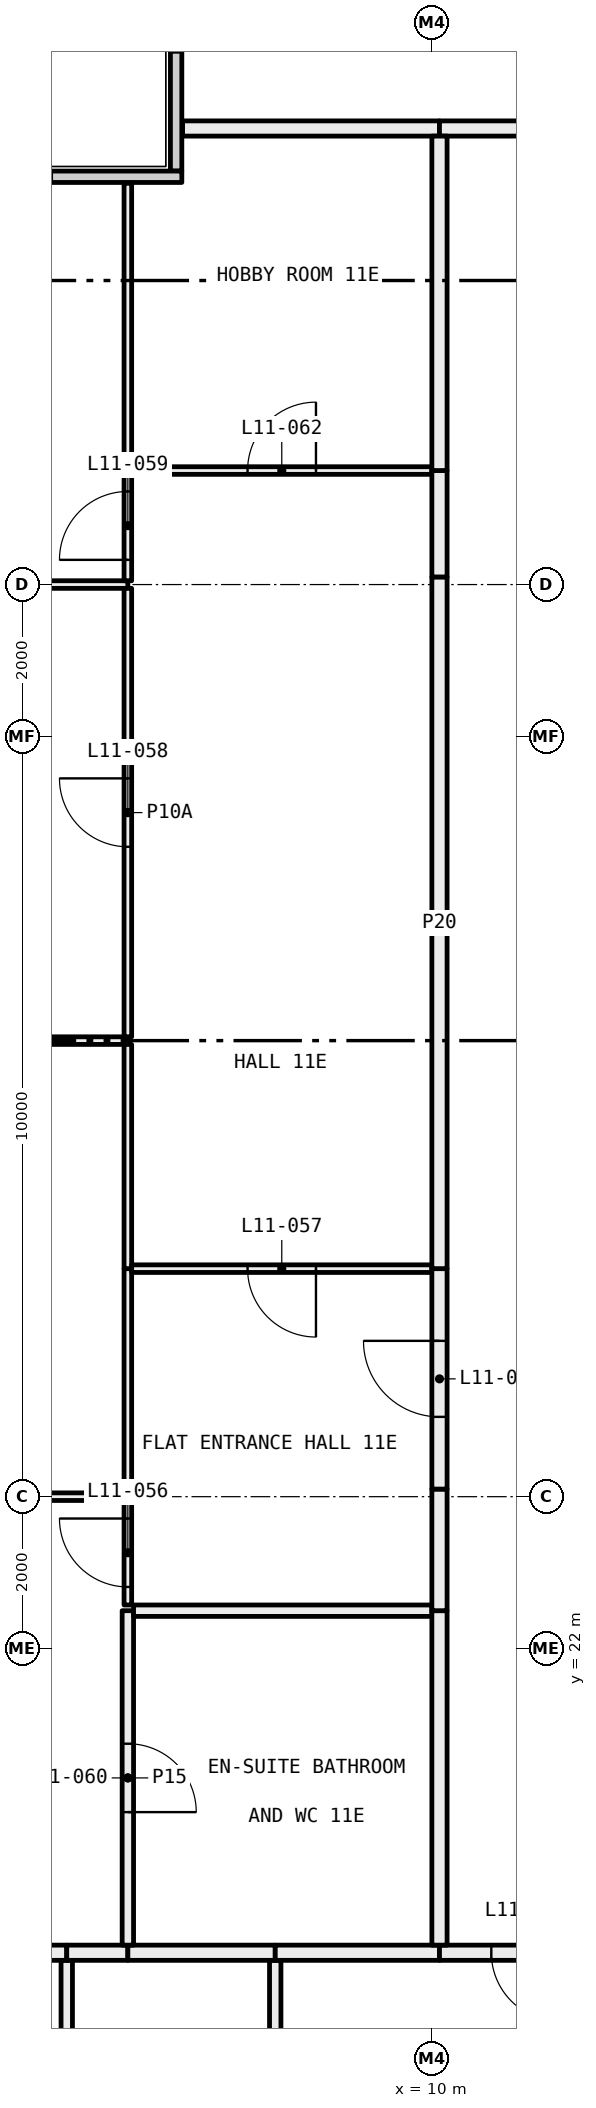
"""IFC4 building model, lengths in metres.
Left out: names, types, materials, properties, quantities, classifications, styles, units other than length and angle.
Written with IfcOpenShell. Run it as: python <this file> out.ifc"""

import sys

from ifc_helpers import new_model, si_unit, direction, frame, frame_2d, origin, place, context, subcontext, project, spatial, rectangle, extrude, element, fill, save


model = new_model("IFC4")
c1 = context("Model", 3, precision=1e-05, world=origin(), true_north=direction((0.0, 1.0)))
c2 = subcontext(c1, "Body", "Model", "MODEL_VIEW")
j1 = project(units=[si_unit("LENGTHUNIT", "METRE"), si_unit("PLANEANGLEUNIT", "RADIAN")], contexts=[c1])
p1 = place(None, origin())
s1 = spatial("IfcSite", under=j1, at=p1, CompositionType="ELEMENT")
p2 = place(p1, origin())
s2 = spatial("IfcBuilding", under=s1, at=p2, CompositionType="ELEMENT")
p3 = place(p2, frame((0.0, 0.0, 50.7)))
s3 = spatial("IfcBuildingStorey", under=s2, at=p3, CompositionType="ELEMENT", Elevation=50.7)
p4 = place(p3, frame((6.635, 41.44, 0.0), z_axis=(0.0, 0.0, 1.0), x_axis=(0.0, 1.0, 0.0)))
e1 = element("IfcWall", 1, at=p4, inside=s3, PredefinedType="ELEMENTEDWALL", context=c2, shape_type="SweptSolid", body=[
    extrude(rectangle(XDim=5.85, YDim=0.15, at=frame_2d((2.925, 0.0))), origin(), (0.0, 0.0, 1.0), 3.05),
])
p5 = place(p4, frame((1.56, 0.0, 0.45)))
e2 = element("IfcOpeningElement", 2, at=p5, cuts=e1, PredefinedType="OPENING", context=c2, shape_type="SweptSolid", body=[
    extrude(rectangle(XDim=4.0, YDim=2.55, at=frame_2d((2.0, 1.275))), frame((0.0, 0.085, 0.0), z_axis=(0.0, -1.0, 0.0), x_axis=(1.0, 0.0, 0.0)), (0.0, 0.0, 1.0), 0.17),
])
p6 = place(p3, frame((0.56, 41.365, 0.0), z_axis=(0.0, 0.0, 1.0), x_axis=(1.0, 0.0, 0.0)))
e3 = element("IfcWall", 3, at=p6, inside=s3, PredefinedType="ELEMENTEDWALL", context=c2, shape_type="SweptSolid", body=[
    extrude(rectangle(XDim=6.15, YDim=0.15, at=frame_2d((3.075, 0.0))), origin(), (0.0, 0.0, 1.0), 3.05),
])
p7 = place(p6, frame((0.44, 0.0, 0.45)))
e4 = element("IfcOpeningElement", 4, at=p7, cuts=e3, PredefinedType="OPENING", context=c2, shape_type="SweptSolid", body=[
    extrude(rectangle(XDim=4.0, YDim=2.55, at=frame_2d((2.0, 1.275))), frame((0.0, 0.085, 0.0), z_axis=(0.0, -1.0, 0.0), x_axis=(1.0, 0.0, 0.0)), (0.0, 0.0, 1.0), 0.17),
])
p8 = place(p3, frame((5.196, 12.075, 0.0), z_axis=(0.0, 0.0, 1.0), x_axis=(0.0, 1.0, 0.0)))
e5 = element("IfcWall", 5, at=p8, inside=s3, PredefinedType="PARTITIONING", context=c2, shape_type="SweptSolid", body=[
    extrude(rectangle(XDim=5.825, YDim=0.15, at=frame_2d((2.913, 0.0))), origin(), (0.0, 0.0, 1.0), 2.45),
])
p9 = place(p3, frame((5.196, 18.0, 0.0), z_axis=(0.0, 0.0, 1.0), x_axis=(-1.0, 0.0, 0.0)))
e6 = element("IfcWall", 6, at=p9, inside=s3, PredefinedType="PARTITIONING", context=c2, shape_type="SweptSolid", body=[
    extrude(rectangle(XDim=4.476, YDim=0.2, at=frame_2d((2.238, 0.0))), origin(), (0.0, 0.0, 1.0), 3.05),
])
p10 = place(p3, frame((7.939, 14.712, 0.0), z_axis=(0.0, 0.0, 1.0), x_axis=(0.0, 1.0, 0.0)))
e7 = element("IfcWall", 7, at=p10, inside=s3, PredefinedType="PARTITIONING", context=c2, shape_type="SweptSolid", body=[
    extrude(rectangle(XDim=3.188, YDim=0.15, at=frame_2d((1.594, 0.0))), origin(), (0.0, 0.0, 1.0), 3.05),
])
p11 = place(p3, frame((6.0, 18.0, 0.0), z_axis=(0.0, 0.0, 1.0), x_axis=(-1.0, 0.0, 0.0)))
e8 = element("IfcWall", 8, at=p11, inside=s3, PredefinedType="PARTITIONING", context=c2, shape_type="SweptSolid", body=[
    extrude(rectangle(XDim=0.804, YDim=0.2, at=frame_2d((0.402, 0.0))), origin(), (0.0, 0.0, 1.0), 3.05),
])
p12 = place(p3, frame((7.939, 18.0, 0.0), z_axis=(0.0, 0.0, 1.0), x_axis=(-1.0, 0.0, 0.0)))
e9 = element("IfcWall", 9, at=p12, inside=s3, PredefinedType="PARTITIONING", context=c2, shape_type="SweptSolid", body=[
    extrude(rectangle(XDim=1.939, YDim=0.2, at=frame_2d((0.969, 0.0))), origin(), (0.0, 0.0, 1.0), 3.05),
])
p13 = place(p3, frame((10.1, 18.0, 0.0), z_axis=(0.0, 0.0, 1.0), x_axis=(-1.0, 0.0, 0.0)))
e10 = element("IfcWall", 10, at=p13, inside=s3, PredefinedType="PARTITIONING", context=c2, shape_type="SweptSolid", body=[
    extrude(rectangle(XDim=2.161, YDim=0.2, at=frame_2d((1.081, 0.0))), origin(), (0.0, 0.0, 1.0), 3.05),
])
p14 = place(p3, frame((12.364, 18.0, 0.0), z_axis=(0.0, 0.0, 1.0), x_axis=(-1.0, 0.0, 0.0)))
e11 = element("IfcWall", 11, at=p14, inside=s3, PredefinedType="PARTITIONING", context=c2, shape_type="SweptSolid", body=[
    extrude(rectangle(XDim=2.264, YDim=0.2, at=frame_2d((1.132, 0.0))), origin(), (0.0, 0.0, 1.0), 3.05),
])
p15 = place(p14, frame((0.682, 0.0, 0.0)))
e12 = element("IfcOpeningElement", 12, at=p15, cuts=e11, PredefinedType="OPENING", context=c2, shape_type="SweptSolid", body=[
    extrude(rectangle(XDim=0.9, YDim=2.1, at=frame_2d((0.45, 1.05))), frame((0.0, 0.11, 0.0), z_axis=(0.0, -1.0, 0.0), x_axis=(1.0, 0.0, 0.0)), (0.0, 0.0, 1.0), 0.22),
])
p16 = place(p3, frame((6.72, 42.0, 0.0), z_axis=(0.0, 0.0, 1.0), x_axis=(1.0, 0.0, 0.0)))
e13 = element("IfcWall", 13, at=p16, inside=s3, PredefinedType="PARTITIONING", context=c2, shape_type="SweptSolid", body=[
    extrude(rectangle(XDim=3.38, YDim=0.2, at=frame_2d((1.69, 0.0))), origin(), (0.0, 0.0, 1.0), 3.05),
])
p17 = place(p3, frame((10.1, 42.0, 0.0), z_axis=(0.0, 0.0, 1.0), x_axis=(1.0, 0.0, 0.0)))
e14 = element("IfcWall", 14, at=p17, inside=s3, PredefinedType="PARTITIONING", context=c2, shape_type="SweptSolid", body=[
    extrude(rectangle(XDim=1.9, YDim=0.2, at=frame_2d((0.95, 0.0))), origin(), (0.0, 0.0, 1.0), 3.05),
])
p18 = place(p3, frame((6.0, 24.0, 0.0), z_axis=(0.0, 0.0, 1.0), x_axis=(-1.0, 0.0, 0.0)))
e15 = element("IfcWall", 15, at=p18, inside=s3, PredefinedType="PARTITIONING", context=c2, shape_type="SweptSolid", body=[
    extrude(rectangle(XDim=5.28, YDim=0.1, at=frame_2d((2.64, 0.0))), origin(), (0.0, 0.0, 1.0), 2.45),
])
p19 = place(p18, frame((2.19, 0.0, 0.0)))
e16 = element("IfcOpeningElement", 16, at=p19, cuts=e15, PredefinedType="OPENING", context=c2, shape_type="SweptSolid", body=[
    extrude(rectangle(XDim=0.9, YDim=2.1, at=frame_2d((0.45, 1.05))), frame((0.0, 0.06, 0.0), z_axis=(0.0, -1.0, 0.0), x_axis=(1.0, 0.0, 0.0)), (0.0, 0.0, 1.0), 0.12),
])
p20 = place(p3, frame((6.0, 18.1, 0.0), z_axis=(0.0, 0.0, 1.0), x_axis=(0.0, 1.0, 0.0)))
e17 = element("IfcWall", 17, at=p20, inside=s3, PredefinedType="PARTITIONING", context=c2, shape_type="SweptSolid", body=[
    extrude(rectangle(XDim=4.4, YDim=0.15, at=frame_2d((2.2, 0.0))), origin(), (0.0, 0.0, 1.0), 3.05),
])
p21 = place(p20, frame((1.75, 0.0, 0.0)))
e18 = element("IfcOpeningElement", 18, at=p21, cuts=e17, PredefinedType="OPENING", context=c2, shape_type="SweptSolid", body=[
    extrude(rectangle(XDim=0.9, YDim=2.1, at=frame_2d((0.45, 1.05))), frame((0.0, 0.085, 0.0), z_axis=(0.0, -1.0, 0.0), x_axis=(1.0, 0.0, 0.0)), (0.0, 0.0, 1.0), 0.17),
])
p22 = place(p3, frame((6.0, 22.575, 0.0), z_axis=(0.0, 0.0, 1.0), x_axis=(0.0, 1.0, 0.0)))
e19 = element("IfcWall", 19, at=p22, inside=s3, PredefinedType="PARTITIONING", context=c2, shape_type="SweptSolid", body=[
    extrude(rectangle(XDim=1.375, YDim=0.1, at=frame_2d((0.688, 0.0))), origin(), (0.0, 0.0, 1.0), 2.45),
])
p23 = place(p22, frame((0.238, 0.0, 0.0)))
e20 = element("IfcOpeningElement", 20, at=p23, cuts=e19, PredefinedType="OPENING", context=c2, shape_type="SweptSolid", body=[
    extrude(rectangle(XDim=0.9, YDim=2.1, at=frame_2d((0.45, 1.05))), frame((0.0, 0.06, 0.0), z_axis=(0.0, -1.0, 0.0), x_axis=(1.0, 0.0, 0.0)), (0.0, 0.0, 1.0), 0.12),
])
p24 = place(p3, frame((6.0, 30.0, 0.0), z_axis=(0.0, 0.0, 1.0), x_axis=(-1.0, 0.0, 0.0)))
e21 = element("IfcWall", 21, at=p24, inside=s3, PredefinedType="PARTITIONING", context=c2, shape_type="SweptSolid", body=[
    extrude(rectangle(XDim=5.28, YDim=0.1, at=frame_2d((2.64, 0.0))), origin(), (0.0, 0.0, 1.0), 3.05),
])
p25 = place(p3, frame((6.0, 24.05, 0.0), z_axis=(0.0, 0.0, 1.0), x_axis=(0.0, 1.0, 0.0)))
e22 = element("IfcWall", 22, at=p25, inside=s3, PredefinedType="PARTITIONING", context=c2, shape_type="SweptSolid", body=[
    extrude(rectangle(XDim=2.95, YDim=0.1, at=frame_2d((1.475, 0.0))), origin(), (0.0, 0.0, 1.0), 2.45),
])
p26 = place(p3, frame((6.0, 27.0, 0.0), z_axis=(0.0, 0.0, 1.0), x_axis=(0.0, 1.0, 0.0)))
e23 = element("IfcWall", 23, at=p26, inside=s3, PredefinedType="PARTITIONING", context=c2, shape_type="SweptSolid", body=[
    extrude(rectangle(XDim=2.95, YDim=0.1, at=frame_2d((1.475, 0.0))), origin(), (0.0, 0.0, 1.0), 3.05),
])
p27 = place(p3, frame((6.0, 36.0, 0.0), z_axis=(0.0, 0.0, 1.0), x_axis=(-1.0, 0.0, 0.0)))
e24 = element("IfcWall", 24, at=p27, inside=s3, PredefinedType="PARTITIONING", context=c2, shape_type="SweptSolid", body=[
    extrude(rectangle(XDim=5.28, YDim=0.1, at=frame_2d((2.64, 0.0))), origin(), (0.0, 0.0, 1.0), 2.45),
])
p28 = place(p3, frame((6.0, 30.05, 0.0), z_axis=(0.0, 0.0, 1.0), x_axis=(0.0, 1.0, 0.0)))
e25 = element("IfcWall", 25, at=p28, inside=s3, PredefinedType="PARTITIONING", context=c2, shape_type="SweptSolid", body=[
    extrude(rectangle(XDim=5.9, YDim=0.1, at=frame_2d((2.95, 0.0))), origin(), (0.0, 0.0, 1.0), 2.45),
])
p29 = place(p28, frame((2.5, 0.0, 0.0)))
e26 = element("IfcOpeningElement", 26, at=p29, cuts=e25, PredefinedType="OPENING", context=c2, shape_type="SweptSolid", body=[
    extrude(rectangle(XDim=0.9, YDim=2.1, at=frame_2d((0.45, 1.05))), frame((0.0, 0.06, 0.0), z_axis=(0.0, -1.0, 0.0), x_axis=(1.0, 0.0, 0.0)), (0.0, 0.0, 1.0), 0.12),
])
p30 = place(p3, frame((6.0, 36.05, 0.0), z_axis=(0.0, 0.0, 1.0), x_axis=(0.0, 1.0, 0.0)))
e27 = element("IfcWall", 27, at=p30, inside=s3, PredefinedType="PARTITIONING", context=c2, shape_type="SweptSolid", body=[
    extrude(rectangle(XDim=1.45, YDim=0.1, at=frame_2d((0.725, 0.0))), origin(), (0.0, 0.0, 1.0), 2.45),
])
p31 = place(p30, frame((0.275, 0.0, 0.0)))
e28 = element("IfcOpeningElement", 28, at=p31, cuts=e27, PredefinedType="OPENING", context=c2, shape_type="SweptSolid", body=[
    extrude(rectangle(XDim=0.9, YDim=2.1, at=frame_2d((0.45, 1.05))), frame((0.0, 0.06, 0.0), z_axis=(0.0, -1.0, 0.0), x_axis=(1.0, 0.0, 0.0)), (0.0, 0.0, 1.0), 0.12),
])
p32 = place(p3, frame((6.0, 37.5, 0.0), z_axis=(0.0, 0.0, 1.0), x_axis=(0.0, 1.0, 0.0)))
e29 = element("IfcWall", 29, at=p32, inside=s3, PredefinedType="PARTITIONING", context=c2, shape_type="SweptSolid", body=[
    extrude(rectangle(XDim=3.78, YDim=0.1, at=frame_2d((1.89, 0.0))), origin(), (0.0, 0.0, 1.0), 3.05),
])
p33 = place(p3, frame((10.0, 22.5, 0.0), z_axis=(0.0, 0.0, 1.0), x_axis=(-1.0, 0.0, 0.0)))
e30 = element("IfcWall", 30, at=p33, inside=s3, PredefinedType="PARTITIONING", context=c2, shape_type="SweptSolid", body=[
    extrude(rectangle(XDim=3.925, YDim=0.15, at=frame_2d((1.962, 0.0))), origin(), (0.0, 0.0, 1.0), 3.05),
])
p34 = place(p3, frame((10.1, 18.1, 0.0), z_axis=(0.0, 0.0, 1.0), x_axis=(0.0, 1.0, 0.0)))
e31 = element("IfcWall", 31, at=p34, inside=s3, PredefinedType="PARTITIONING", context=c2, shape_type="SweptSolid", body=[
    extrude(rectangle(XDim=4.4, YDim=0.2, at=frame_2d((2.2, 0.0))), origin(), (0.0, 0.0, 1.0), 3.05),
])
p35 = place(p3, frame((10.0, 27.0, 0.0), z_axis=(0.0, 0.0, 1.0), x_axis=(-1.0, 0.0, 0.0)))
e32 = element("IfcWall", 32, at=p35, inside=s3, PredefinedType="PARTITIONING", context=c2, shape_type="SweptSolid", body=[
    extrude(rectangle(XDim=3.95, YDim=0.1, at=frame_2d((1.975, 0.0))), origin(), (0.0, 0.0, 1.0), 3.05),
])
p36 = place(p35, frame((1.525, 0.0, 0.0)))
e33 = element("IfcOpeningElement", 33, at=p36, cuts=e32, PredefinedType="OPENING", context=c2, shape_type="SweptSolid", body=[
    extrude(rectangle(XDim=0.9, YDim=2.1, at=frame_2d((0.45, 1.05))), frame((0.0, 0.06, 0.0), z_axis=(0.0, -1.0, 0.0), x_axis=(1.0, 0.0, 0.0)), (0.0, 0.0, 1.0), 0.12),
])
p37 = place(p3, frame((10.1, 22.5, 0.0), z_axis=(0.0, 0.0, 1.0), x_axis=(0.0, 1.0, 0.0)))
e34 = element("IfcWall", 34, at=p37, inside=s3, PredefinedType="PARTITIONING", context=c2, shape_type="SweptSolid", body=[
    extrude(rectangle(XDim=1.6, YDim=0.2, at=frame_2d((0.8, 0.0))), origin(), (0.0, 0.0, 1.0), 2.45),
])
p38 = place(p3, frame((10.1, 24.1, 0.0), z_axis=(0.0, 0.0, 1.0), x_axis=(0.0, 1.0, 0.0)))
e35 = element("IfcWall", 35, at=p38, inside=s3, PredefinedType="PARTITIONING", context=c2, shape_type="SweptSolid", body=[
    extrude(rectangle(XDim=2.9, YDim=0.2, at=frame_2d((1.45, 0.0))), origin(), (0.0, 0.0, 1.0), 3.05),
])
p39 = place(p38, frame((0.95, 0.0, 0.0)))
e36 = element("IfcOpeningElement", 36, at=p39, cuts=e35, PredefinedType="OPENING", context=c2, shape_type="SweptSolid", body=[
    extrude(rectangle(XDim=1.0, YDim=2.1, at=frame_2d((0.5, 1.05))), frame((0.0, 0.11, 0.0), z_axis=(0.0, -1.0, 0.0), x_axis=(1.0, 0.0, 0.0)), (0.0, 0.0, 1.0), 0.22),
])
p40 = place(p3, frame((10.0, 37.5, 0.0), z_axis=(0.0, 0.0, 1.0), x_axis=(-1.0, 0.0, 0.0)))
e37 = element("IfcWall", 37, at=p40, inside=s3, PredefinedType="PARTITIONING", context=c2, shape_type="SweptSolid", body=[
    extrude(rectangle(XDim=3.95, YDim=0.1, at=frame_2d((1.975, 0.0))), origin(), (0.0, 0.0, 1.0), 3.05),
])
p41 = place(p40, frame((1.525, 0.0, 0.0)))
e38 = element("IfcOpeningElement", 38, at=p41, cuts=e37, PredefinedType="OPENING", context=c2, shape_type="SweptSolid", body=[
    extrude(rectangle(XDim=0.9, YDim=2.1, at=frame_2d((0.45, 1.05))), frame((0.0, 0.06, 0.0), z_axis=(0.0, -1.0, 0.0), x_axis=(1.0, 0.0, 0.0)), (0.0, 0.0, 1.0), 0.12),
])
p42 = place(p3, frame((10.1, 27.0, 0.0), z_axis=(0.0, 0.0, 1.0), x_axis=(0.0, 1.0, 0.0)))
e39 = element("IfcWall", 39, at=p42, inside=s3, PredefinedType="PARTITIONING", context=c2, shape_type="SweptSolid", body=[
    extrude(rectangle(XDim=9.1, YDim=0.2, at=frame_2d((4.55, 0.0))), origin(), (0.0, 0.0, 1.0), 2.45),
])
p43 = place(p3, frame((10.1, 36.1, 0.0), z_axis=(0.0, 0.0, 1.0), x_axis=(0.0, 1.0, 0.0)))
e40 = element("IfcWall", 40, at=p43, inside=s3, PredefinedType="PARTITIONING", context=c2, shape_type="SweptSolid", body=[
    extrude(rectangle(XDim=1.4, YDim=0.2, at=frame_2d((0.7, 0.0))), origin(), (0.0, 0.0, 1.0), 3.05),
])
p44 = place(p3, frame((10.1, 37.5, 0.0), z_axis=(0.0, 0.0, 1.0), x_axis=(0.0, 1.0, 0.0)))
e41 = element("IfcWall", 41, at=p44, inside=s3, PredefinedType="PARTITIONING", context=c2, shape_type="SweptSolid", body=[
    extrude(rectangle(XDim=4.4, YDim=0.2, at=frame_2d((2.2, 0.0))), origin(), (0.0, 0.0, 1.0), 3.05),
])
p45 = place(p15, origin())
e42 = element("IfcDoor", 42, at=p45, inside=s3, OperationType="SINGLE_SWING_RIGHT", PredefinedType="DOOR", context=c2, shape_type="SweptSolid", body=[
    extrude(rectangle(XDim=0.9, YDim=2.1, at=frame_2d((0.45, 1.05))), frame((0.0, 0.025, 0.0), z_axis=(0.0, -1.0, 0.0), x_axis=(1.0, 0.0, 0.0)), (0.0, 0.0, 1.0), 0.05),
])
fill(e12, e42)
p46 = place(p39, origin())
e43 = element("IfcDoor", 43, at=p46, inside=s3, OperationType="SINGLE_SWING_LEFT", PredefinedType="DOOR", context=c2, shape_type="SweptSolid", body=[
    extrude(rectangle(XDim=1.0, YDim=2.1, at=frame_2d((0.5, 1.05))), frame((0.0, 0.025, 0.0), z_axis=(0.0, -1.0, 0.0), x_axis=(1.0, 0.0, 0.0)), (0.0, 0.0, 1.0), 0.05),
])
fill(e36, e43)
p47 = place(p23, origin())
e44 = element("IfcDoor", 44, at=p47, inside=s3, OperationType="SINGLE_SWING_LEFT", PredefinedType="DOOR", context=c2, shape_type="SweptSolid", body=[
    extrude(rectangle(XDim=0.9, YDim=2.1, at=frame_2d((0.45, 1.05))), frame((0.0, 0.025, 0.0), z_axis=(0.0, -1.0, 0.0), x_axis=(1.0, 0.0, 0.0)), (0.0, 0.0, 1.0), 0.05),
])
fill(e20, e44)
p48 = place(p36, origin())
e45 = element("IfcDoor", 45, at=p48, inside=s3, OperationType="SINGLE_SWING_RIGHT", PredefinedType="DOOR", context=c2, shape_type="SweptSolid", body=[
    extrude(rectangle(XDim=0.9, YDim=2.1, at=frame_2d((0.45, 1.05))), frame((0.0, 0.025, 0.0), z_axis=(0.0, -1.0, 0.0), x_axis=(1.0, 0.0, 0.0)), (0.0, 0.0, 1.0), 0.05),
])
fill(e33, e45)
p49 = place(p29, origin())
e46 = element("IfcDoor", 46, at=p49, inside=s3, OperationType="SINGLE_SWING_LEFT", PredefinedType="DOOR", context=c2, shape_type="SweptSolid", body=[
    extrude(rectangle(XDim=0.9, YDim=2.1, at=frame_2d((0.45, 1.05))), frame((0.0, 0.025, 0.0), z_axis=(0.0, -1.0, 0.0), x_axis=(1.0, 0.0, 0.0)), (0.0, 0.0, 1.0), 0.05),
])
fill(e26, e46)
p50 = place(p31, origin())
e47 = element("IfcDoor", 47, at=p50, inside=s3, OperationType="SINGLE_SWING_RIGHT", PredefinedType="DOOR", context=c2, shape_type="SweptSolid", body=[
    extrude(rectangle(XDim=0.9, YDim=2.1, at=frame_2d((0.45, 1.05))), frame((0.0, 0.025, 0.0), z_axis=(0.0, -1.0, 0.0), x_axis=(1.0, 0.0, 0.0)), (0.0, 0.0, 1.0), 0.05),
])
fill(e28, e47)
p51 = place(p21, frame((0.9, 0.0, 0.0), x_axis=(-1.0, 0.0, 0.0)))
e48 = element("IfcDoor", 48, at=p51, inside=s3, OperationType="SINGLE_SWING_LEFT", PredefinedType="DOOR", context=c2, shape_type="SweptSolid", body=[
    extrude(rectangle(XDim=0.9, YDim=2.1, at=frame_2d((0.45, 1.05))), frame((0.0, 0.025, 0.0), z_axis=(0.0, -1.0, 0.0), x_axis=(1.0, 0.0, 0.0)), (0.0, 0.0, 1.0), 0.05),
])
fill(e18, e48)
p52 = place(p41, frame((0.9, 0.0, 0.0), x_axis=(-1.0, 0.0, 0.0)))
e49 = element("IfcDoor", 49, at=p52, inside=s3, OperationType="SINGLE_SWING_LEFT", PredefinedType="DOOR", context=c2, shape_type="SweptSolid", body=[
    extrude(rectangle(XDim=0.9, YDim=2.1, at=frame_2d((0.45, 1.05))), frame((0.0, 0.025, 0.0), z_axis=(0.0, -1.0, 0.0), x_axis=(1.0, 0.0, 0.0)), (0.0, 0.0, 1.0), 0.05),
])
fill(e38, e49)
save(model, sys.argv[1])
